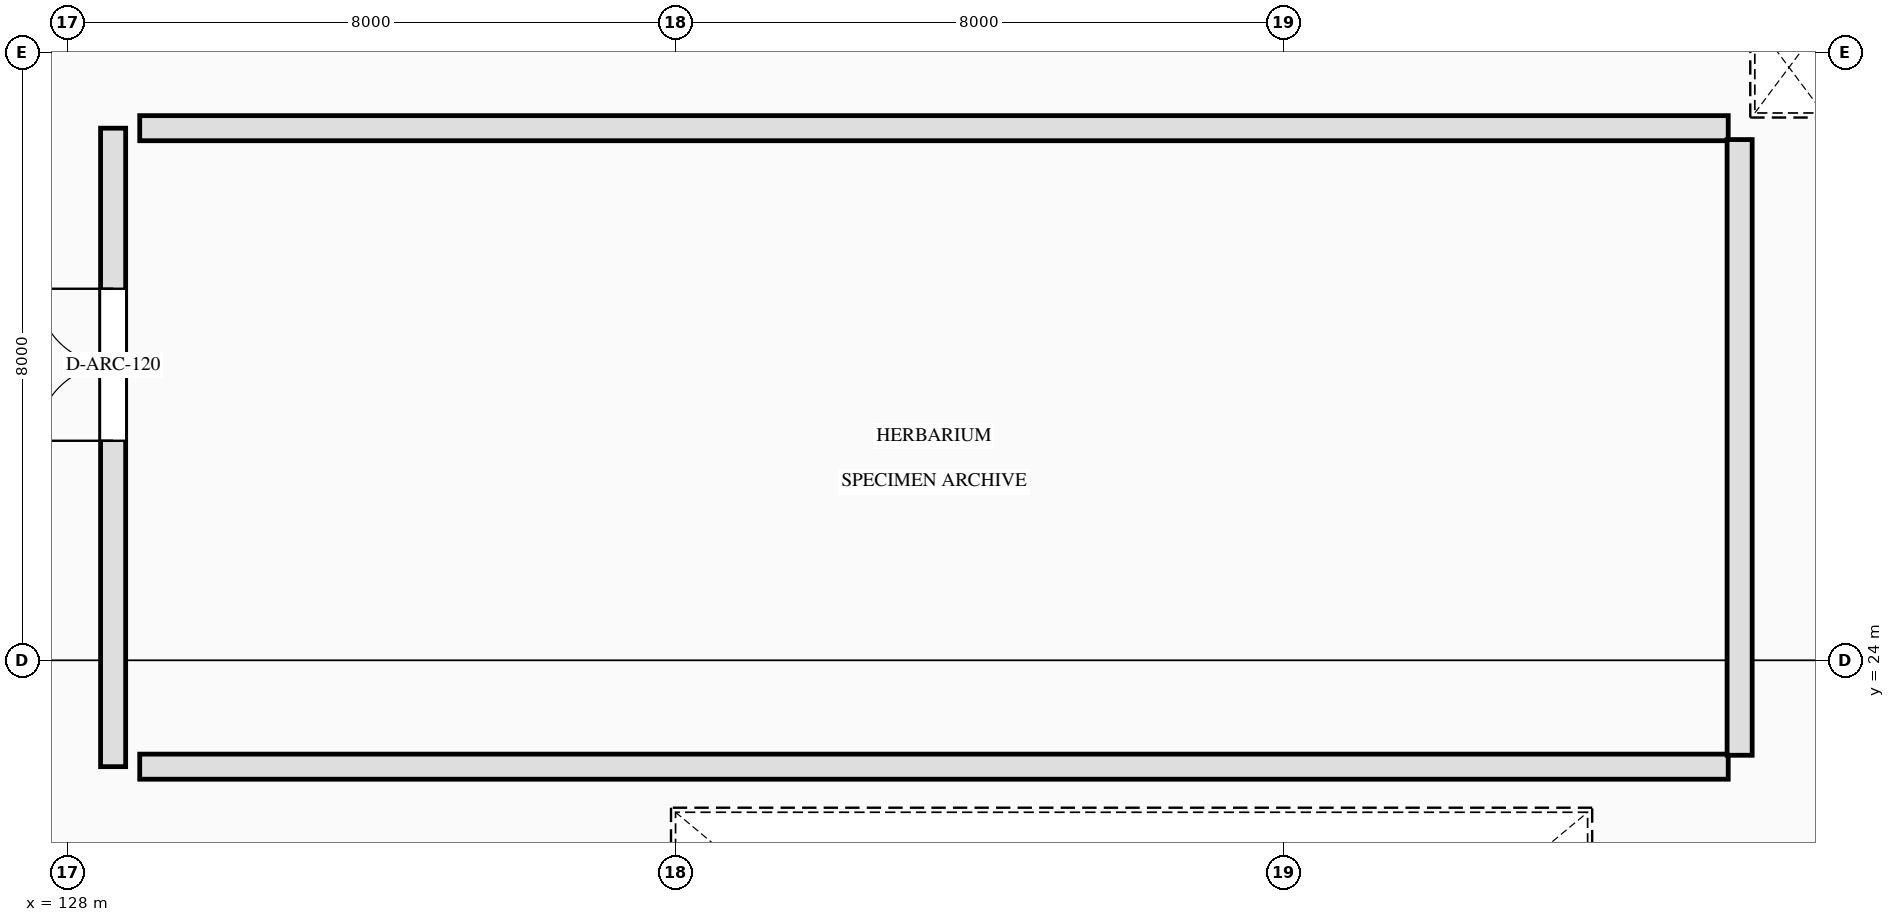
"""IFC4 building model, lengths in metres.
Left out: names, types, materials, properties, quantities, classifications, styles, units other than length and angle.
Written with IfcOpenShell. Run it as: python <this file> out.ifc"""

import sys

from ifc_helpers import new_model, si_unit, direction, frame, frame_2d, origin, place, context, subcontext, project, spatial, rectangle, extrude, element, fill, save


model = new_model("IFC4")
c1 = context("Model", 3, precision=1e-05, world=origin(), true_north=direction((0.0, 1.0)))
c2 = subcontext(c1, "Body", "Model", "MODEL_VIEW")
j1 = project(units=[si_unit("LENGTHUNIT", "METRE"), si_unit("PLANEANGLEUNIT", "RADIAN")], contexts=[c1])
p1 = place(None, origin())
s1 = spatial("IfcSite", under=j1, at=p1, CompositionType="ELEMENT")
p2 = place(p1, origin())
s2 = spatial("IfcBuilding", under=s1, at=p2, CompositionType="ELEMENT")
p3 = place(p2, frame((0.0, 0.0, 26.0)))
s3 = spatial("IfcBuildingStorey", under=s2, at=p3, CompositionType="ELEMENT", Elevation=26.0)
p4 = place(p3, frame((128.6, 22.6, 0.0), z_axis=(0.0, 0.0, 1.0), x_axis=(0.0, 1.0, 0.0)))
e1 = element("IfcWall", 1, at=p4, inside=s3, PredefinedType="SOLIDWALL", context=c2, shape_type="SweptSolid", body=[
    extrude(rectangle(XDim=8.4, YDim=0.33, at=frame_2d((4.2, 0.0))), origin(), (0.0, 0.0, 1.0), 7.82),
])
p5 = place(p4, frame((4.288, 0.0, 0.0)))
e2 = element("IfcOpeningElement", 2, at=p5, cuts=e1, PredefinedType="OPENING", context=c2, shape_type="SweptSolid", body=[
    extrude(rectangle(XDim=2.0, YDim=2.5, at=frame_2d((1.0, 1.25))), frame((0.0, 0.175, 0.0), z_axis=(0.0, -1.0, 0.0), x_axis=(1.0, 0.0, 0.0)), (0.0, 0.0, 1.0), 0.35),
])
for number, where, z_axis, x_axis in (
    (3, (128.95, 22.6, 0.0), (0.0, 0.0, 1.0), (1.0, 0.0, 0.0)),
    (4, (128.95, 31.0, 0.0), (0.0, 0.0, 1.0), (1.0, 0.0, 0.0)),
):
    element("IfcWall", number, at=place(p3, frame(where, z_axis=z_axis, x_axis=x_axis)), inside=s3, PredefinedType="SOLIDWALL", context=c2, shape_type="SweptSolid", body=[
        extrude(rectangle(XDim=20.9, YDim=0.33, at=frame_2d((10.45, 0.0))), origin(), (0.0, 0.0, 1.0), 7.82),
    ])
p6 = place(p3, frame((150.0, 22.75, 0.0), z_axis=(0.0, 0.0, 1.0), x_axis=(0.0, 1.0, 0.0)))
e5 = element("IfcWall", 5, at=p6, inside=s3, PredefinedType="SOLIDWALL", context=c2, shape_type="SweptSolid", body=[
    extrude(rectangle(XDim=8.1, YDim=0.33, at=frame_2d((4.05, 0.0))), origin(), (0.0, 0.0, 1.0), 7.82),
])
p7 = place(p5, origin())
e6 = element("IfcDoor", 6, at=p7, inside=s3, OperationType="DOUBLE_DOOR_SINGLE_SWING", PredefinedType="DOOR", context=c2, shape_type="SweptSolid", body=[
    extrude(rectangle(XDim=2.0, YDim=2.5, at=frame_2d((1.0, 1.25))), frame((0.0, 0.025, 0.0), z_axis=(0.0, -1.0, 0.0), x_axis=(1.0, 0.0, 0.0)), (0.0, 0.0, 1.0), 0.05),
])
fill(e2, e6)
save(model, sys.argv[1])
